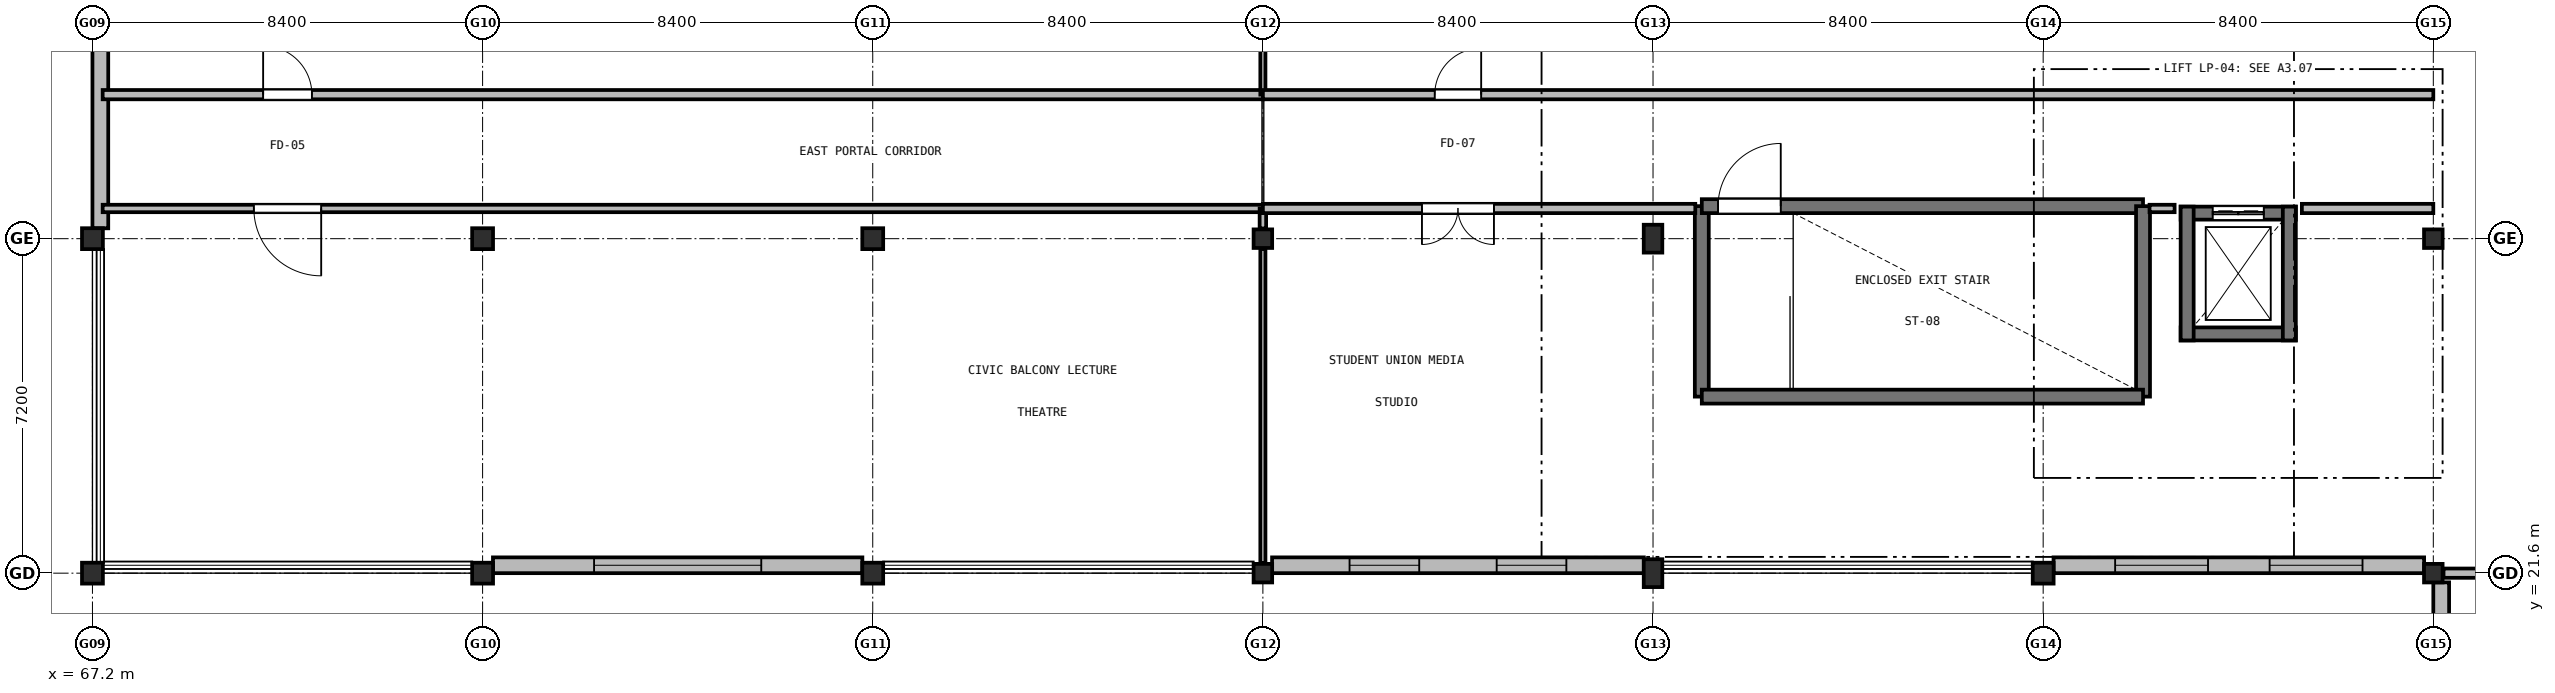
"""IFC4 building model, lengths in metres.
Left out: names, types, materials, properties, quantities, classifications, styles, units other than length and angle.
Written with IfcOpenShell. Run it as: python <this file> out.ifc"""

import sys

from ifc_helpers import new_model, si_unit, direction, frame, frame_2d, origin, origin_2d, place, context, subcontext, project, spatial, rectangle, extrude, element, fill, save


model = new_model("IFC4")
c1 = context("Model", 3, precision=1e-05, world=origin(), true_north=direction((0.0, 1.0)))
c2 = subcontext(c1, "Body", "Model", "MODEL_VIEW")
j1 = project(units=[si_unit("LENGTHUNIT", "METRE"), si_unit("PLANEANGLEUNIT", "RADIAN")], contexts=[c1])
p1 = place(None, origin())
s1 = spatial("IfcSite", under=j1, at=p1, CompositionType="ELEMENT")
p2 = place(p1, origin())
s2 = spatial("IfcBuilding", under=s1, at=p2, CompositionType="ELEMENT")
p3 = place(p2, frame((0.0, 0.0, 5.1)))
s3 = spatial("IfcBuildingStorey", under=s2, at=p3, CompositionType="ELEMENT", Elevation=5.1)
for number, where, z_axis, x_axis in (
    (1, (67.2, 21.6, 0.0), (0.0, 0.0, 1.0), (1.0, 0.0, 0.0)),
    (2, (67.2, 28.8, 0.0), (0.0, 0.0, 1.0), (1.0, 0.0, 0.0)),
    (3, (75.6, 21.6, 0.0), (0.0, 0.0, 1.0), (1.0, 0.0, 0.0)),
    (4, (75.6, 28.8, 0.0), (0.0, 0.0, 1.0), (1.0, 0.0, 0.0)),
    (5, (84.0, 21.6, 0.0), (0.0, 0.0, 1.0), (1.0, 0.0, 0.0)),
    (6, (84.0, 28.8, 0.0), (0.0, 0.0, 1.0), (1.0, 0.0, 0.0)),
):
    element("IfcColumn", number, at=place(p3, frame(where, z_axis=z_axis, x_axis=x_axis)), inside=s3, PredefinedType="COLUMN", context=c2, shape_type="SweptSolid", body=[
        extrude(rectangle(XDim=0.45, YDim=0.45, at=origin_2d()), origin(), (0.0, 0.0, 1.0), 4.2),
    ])
for number, where, z_axis, x_axis in (
    (7, (92.4, 21.6, 0.0), (0.0, 0.0, 1.0), (1.0, 0.0, 0.0)),
    (8, (92.4, 28.8, 0.0), (0.0, 0.0, 1.0), (1.0, 0.0, 0.0)),
):
    element("IfcColumn", number, at=place(p3, frame(where, z_axis=z_axis, x_axis=x_axis)), inside=s3, PredefinedType="COLUMN", context=c2, shape_type="SweptSolid", body=[
        extrude(rectangle(XDim=0.4, YDim=0.4, at=origin_2d()), origin(), (0.0, 0.0, 1.0), 4.2),
    ])
for number, where, z_axis, x_axis in (
    (9, (100.8, 21.6, 0.0), (0.0, 0.0, 1.0), (1.0, 0.0, 0.0)),
    (10, (100.8, 28.8, 0.0), (0.0, 0.0, 1.0), (1.0, 0.0, 0.0)),
):
    element("IfcColumn", number, at=place(p3, frame(where, z_axis=z_axis, x_axis=x_axis)), inside=s3, PredefinedType="COLUMN", context=c2, shape_type="SweptSolid", body=[
        extrude(rectangle(XDim=0.4, YDim=0.6, at=origin_2d()), origin(), (0.0, 0.0, 1.0), 4.2),
    ])
p4 = place(p3, frame((109.2, 21.6, 0.0), z_axis=(0.0, 0.0, 1.0), x_axis=(1.0, 0.0, 0.0)))
e11 = element("IfcColumn", 11, at=p4, inside=s3, PredefinedType="COLUMN", context=c2, shape_type="SweptSolid", body=[
    extrude(rectangle(XDim=0.45, YDim=0.45, at=origin_2d()), origin(), (0.0, 0.0, 1.0), 4.2),
])
for number, where, z_axis, x_axis in (
    (12, (117.6, 21.6, 0.0), (0.0, 0.0, 1.0), (1.0, 0.0, 0.0)),
    (13, (117.6, 28.8, 0.0), (0.0, 0.0, 1.0), (1.0, 0.0, 0.0)),
):
    element("IfcColumn", number, at=place(p3, frame(where, z_axis=z_axis, x_axis=x_axis)), inside=s3, PredefinedType="COLUMN", context=c2, shape_type="SweptSolid", body=[
        extrude(rectangle(XDim=0.4, YDim=0.4, at=origin_2d()), origin(), (0.0, 0.0, 1.0), 4.2),
    ])
p5 = place(p3, frame((117.77, 14.598, 0.0), z_axis=(0.0, 0.0, 1.0), x_axis=(0.0, 1.0, 0.0)))
e14 = element("IfcWall", 14, at=p5, inside=s3, PredefinedType="SOLIDWALL", context=c2, shape_type="SweptSolid", body=[
    extrude(rectangle(XDim=6.804, YDim=0.34, at=frame_2d((3.402, 0.0))), origin(), (0.0, 0.0, 1.0), 3.31),
])
p6 = place(p5, frame((2.202, 0.0, 0.95)))
e15 = element("IfcOpeningElement", 15, at=p6, cuts=e14, PredefinedType="OPENING", context=c2, shape_type="SweptSolid", body=[
    extrude(rectangle(XDim=2.4, YDim=1.6, at=frame_2d((1.2, 0.8))), frame((0.0, 0.18, 0.0), z_axis=(0.0, -1.0, 0.0), x_axis=(1.0, 0.0, 0.0)), (0.0, 0.0, 1.0), 0.36),
])
p7 = place(p3, frame((117.402, 21.77, 0.0), z_axis=(0.0, 0.0, 1.0), x_axis=(-1.0, 0.0, 0.0)))
e16 = element("IfcWall", 16, at=p7, inside=s3, PredefinedType="SOLIDWALL", context=c2, shape_type="SweptSolid", body=[
    extrude(rectangle(XDim=7.979, YDim=0.34, at=frame_2d((3.99, 0.0))), origin(), (0.0, 0.0, 1.0), 3.11),
])
p8 = place(p7, frame((1.326, 0.0, 0.95)))
e17 = element("IfcOpeningElement", 17, at=p8, cuts=e16, PredefinedType="OPENING", context=c2, shape_type="SweptSolid", body=[
    extrude(rectangle(XDim=2.0, YDim=1.5, at=frame_2d((1.0, 0.75))), frame((0.0, 0.18, 0.0), z_axis=(0.0, -1.0, 0.0), x_axis=(1.0, 0.0, 0.0)), (0.0, 0.0, 1.0), 0.36),
])
p9 = place(p7, frame((4.653, 0.0, 0.95)))
e18 = element("IfcOpeningElement", 18, at=p9, cuts=e16, PredefinedType="OPENING", context=c2, shape_type="SweptSolid", body=[
    extrude(rectangle(XDim=2.0, YDim=1.5, at=frame_2d((1.0, 0.75))), frame((0.0, 0.18, 0.0), z_axis=(0.0, -1.0, 0.0), x_axis=(1.0, 0.0, 0.0)), (0.0, 0.0, 1.0), 0.36),
])
p10 = place(p3, frame((100.602, 21.77, 0.0), z_axis=(0.0, 0.0, 1.0), x_axis=(-1.0, 0.0, 0.0)))
e19 = element("IfcWall", 19, at=p10, inside=s3, PredefinedType="SOLIDWALL", context=c2, shape_type="SweptSolid", body=[
    extrude(rectangle(XDim=8.004, YDim=0.34, at=frame_2d((4.002, 0.0))), origin(), (0.0, 0.0, 1.0), 3.11),
])
p11 = place(p10, frame((1.668, 0.0, 0.95)))
e20 = element("IfcOpeningElement", 20, at=p11, cuts=e19, PredefinedType="OPENING", context=c2, shape_type="SweptSolid", body=[
    extrude(rectangle(XDim=1.5, YDim=1.4, at=frame_2d((0.75, 0.7))), frame((0.0, 0.18, 0.0), z_axis=(0.0, -1.0, 0.0), x_axis=(1.0, 0.0, 0.0)), (0.0, 0.0, 1.0), 0.36),
])
p12 = place(p10, frame((4.836, 0.0, 0.95)))
e21 = element("IfcOpeningElement", 21, at=p12, cuts=e19, PredefinedType="OPENING", context=c2, shape_type="SweptSolid", body=[
    extrude(rectangle(XDim=1.5, YDim=1.4, at=frame_2d((0.75, 0.7))), frame((0.0, 0.18, 0.0), z_axis=(0.0, -1.0, 0.0), x_axis=(1.0, 0.0, 0.0)), (0.0, 0.0, 1.0), 0.36),
])
p13 = place(p3, frame((83.777, 21.77, 0.0), z_axis=(0.0, 0.0, 1.0), x_axis=(-1.0, 0.0, 0.0)))
e22 = element("IfcWall", 22, at=p13, inside=s3, PredefinedType="SOLIDWALL", context=c2, shape_type="SweptSolid", body=[
    extrude(rectangle(XDim=7.954, YDim=0.34, at=frame_2d((3.977, 0.0))), origin(), (0.0, 0.0, 1.0), 3.11),
])
p14 = place(p13, frame((2.177, 0.0, 0.95)))
e23 = element("IfcOpeningElement", 23, at=p14, cuts=e22, PredefinedType="OPENING", context=c2, shape_type="SweptSolid", body=[
    extrude(rectangle(XDim=3.6, YDim=1.91, at=frame_2d((1.8, 0.955))), frame((0.0, 0.18, 0.0), z_axis=(0.0, -1.0, 0.0), x_axis=(1.0, 0.0, 0.0)), (0.0, 0.0, 1.0), 0.36),
])
p15 = place(p3, frame((67.37, 29.023, 0.0), z_axis=(0.0, 0.0, 1.0), x_axis=(0.0, 1.0, 0.0)))
e24 = element("IfcWall", 24, at=p15, inside=s3, PredefinedType="SOLIDWALL", context=c2, shape_type="SweptSolid", body=[
    extrude(rectangle(XDim=6.754, YDim=0.34, at=frame_2d((3.377, 0.0))), origin(), (0.0, 0.0, 1.0), 3.31),
])
p16 = place(p3, frame((101.85, 25.4, 0.0), z_axis=(0.0, 0.0, 1.0), x_axis=(0.0, 1.0, 0.0)))
e25 = element("IfcWall", 25, at=p16, inside=s3, PredefinedType="SHEAR", context=c2, shape_type="SweptSolid", body=[
    extrude(rectangle(XDim=4.1, YDim=0.3, at=frame_2d((2.05, 0.0))), origin(), (0.0, 0.0, 1.0), 3.92),
])
p17 = place(p3, frame((101.85, 29.5, 0.0), z_axis=(0.0, 0.0, 1.0), x_axis=(1.0, 0.0, 0.0)))
e26 = element("IfcWall", 26, at=p17, inside=s3, PredefinedType="SHEAR", context=c2, shape_type="SweptSolid", body=[
    extrude(rectangle(XDim=9.5, YDim=0.3, at=frame_2d((4.75, 0.0))), origin(), (0.0, 0.0, 1.0), 3.92),
])
p18 = place(p17, frame((0.35, 0.0, 0.0)))
e27 = element("IfcOpeningElement", 27, at=p18, cuts=e26, PredefinedType="OPENING", context=c2, shape_type="SweptSolid", body=[
    extrude(rectangle(XDim=1.35, YDim=2.2, at=frame_2d((0.675, 1.1))), frame((0.0, 0.16, 0.0), z_axis=(0.0, -1.0, 0.0), x_axis=(1.0, 0.0, 0.0)), (0.0, 0.0, 1.0), 0.32),
])
p19 = place(p3, frame((111.35, 29.5, 0.0), z_axis=(0.0, 0.0, 1.0), x_axis=(0.0, -1.0, 0.0)))
e28 = element("IfcWall", 28, at=p19, inside=s3, PredefinedType="SHEAR", context=c2, shape_type="SweptSolid", body=[
    extrude(rectangle(XDim=4.1, YDim=0.3, at=frame_2d((2.05, 0.0))), origin(), (0.0, 0.0, 1.0), 3.92),
])
p20 = place(p3, frame((111.35, 25.4, 0.0), z_axis=(0.0, 0.0, 1.0), x_axis=(-1.0, 0.0, 0.0)))
e29 = element("IfcWall", 29, at=p20, inside=s3, PredefinedType="SHEAR", context=c2, shape_type="SweptSolid", body=[
    extrude(rectangle(XDim=9.5, YDim=0.3, at=frame_2d((4.75, 0.0))), origin(), (0.0, 0.0, 1.0), 3.92),
])
p21 = place(p3, frame((114.64, 26.75, 0.0), z_axis=(0.0, 0.0, 1.0), x_axis=(-1.0, 0.0, 0.0)))
e30 = element("IfcWall", 30, at=p21, inside=s3, PredefinedType="SHEAR", context=c2, shape_type="SweptSolid", body=[
    extrude(rectangle(XDim=2.48, YDim=0.28, at=frame_2d((1.24, 0.0))), origin(), (0.0, 0.0, 1.0), 3.92),
])
p22 = place(p3, frame((112.16, 29.35, 0.0), z_axis=(0.0, 0.0, 1.0), x_axis=(1.0, 0.0, 0.0)))
e31 = element("IfcWall", 31, at=p22, inside=s3, PredefinedType="SHEAR", context=c2, shape_type="SweptSolid", body=[
    extrude(rectangle(XDim=2.48, YDim=0.28, at=frame_2d((1.24, 0.0))), origin(), (0.0, 0.0, 1.0), 3.92),
])
p23 = place(p22, frame((0.69, 0.0, 0.0)))
e32 = element("IfcOpeningElement", 32, at=p23, cuts=e31, PredefinedType="OPENING", context=c2, shape_type="SweptSolid", body=[
    extrude(rectangle(XDim=1.1, YDim=2.15, at=frame_2d((0.55, 1.075))), frame((0.0, 0.15, 0.0), z_axis=(0.0, -1.0, 0.0), x_axis=(1.0, 0.0, 0.0)), (0.0, 0.0, 1.0), 0.3),
])
for number, where, z_axis, x_axis in (
    (33, (112.3, 26.61, 0.0), (0.0, 0.0, 1.0), (0.0, 1.0, 0.0)),
    (34, (114.5, 29.49, 0.0), (0.0, 0.0, 1.0), (0.0, -1.0, 0.0)),
):
    element("IfcWall", number, at=place(p3, frame(where, z_axis=z_axis, x_axis=x_axis)), inside=s3, PredefinedType="SHEAR", context=c2, shape_type="SweptSolid", body=[
        extrude(rectangle(XDim=2.88, YDim=0.28, at=frame_2d((1.44, 0.0))), origin(), (0.0, 0.0, 1.0), 3.92),
    ])
p24 = place(p3, frame((67.42, 31.9, 0.0), z_axis=(0.0, 0.0, 1.0), x_axis=(1.0, 0.0, 0.0)))
e35 = element("IfcWall", 35, at=p24, inside=s3, PredefinedType="SOLIDWALL", context=c2, shape_type="SweptSolid", body=[
    extrude(rectangle(XDim=24.98, YDim=0.2, at=frame_2d((12.49, 0.0))), origin(), (0.0, 0.0, 1.0), 3.305),
])
p25 = place(p24, frame((3.455, 0.0, 0.0)))
e36 = element("IfcOpeningElement", 36, at=p25, cuts=e35, PredefinedType="OPENING", context=c2, shape_type="SweptSolid", body=[
    extrude(rectangle(XDim=1.05, YDim=2.15, at=frame_2d((0.525, 1.075))), frame((0.0, 0.11, 0.0), z_axis=(0.0, -1.0, 0.0), x_axis=(1.0, 0.0, 0.0)), (0.0, 0.0, 1.0), 0.22),
])
p26 = place(p3, frame((92.4, 31.9, 0.0), z_axis=(0.0, 0.0, 1.0), x_axis=(0.0, 1.0, 0.0)))
e37 = element("IfcWall", 37, at=p26, inside=s3, PredefinedType="PARTITIONING", context=c2, shape_type="SweptSolid", body=[
    extrude(rectangle(XDim=3.83, YDim=0.11, at=frame_2d((1.915, 0.0))), origin(), (0.0, 0.0, 1.0), 3.105),
])
p27 = place(p3, frame((92.4, 31.9, 0.0), z_axis=(0.0, 0.0, 1.0), x_axis=(1.0, 0.0, 0.0)))
e38 = element("IfcWall", 38, at=p27, inside=s3, PredefinedType="SOLIDWALL", context=c2, shape_type="SweptSolid", body=[
    extrude(rectangle(XDim=25.2, YDim=0.2, at=frame_2d((12.6, 0.0))), origin(), (0.0, 0.0, 1.0), 3.305),
])
p28 = place(p27, frame((3.7, 0.0, 0.0)))
e39 = element("IfcOpeningElement", 39, at=p28, cuts=e38, PredefinedType="OPENING", context=c2, shape_type="SweptSolid", body=[
    extrude(rectangle(XDim=1.0, YDim=2.1, at=frame_2d((0.5, 1.05))), frame((0.0, 0.11, 0.0), z_axis=(0.0, -1.0, 0.0), x_axis=(1.0, 0.0, 0.0)), (0.0, 0.0, 1.0), 0.22),
])
p29 = place(p3, frame((92.4, 29.45, 0.0), z_axis=(0.0, 0.0, 1.0), x_axis=(-1.0, 0.0, 0.0)))
e40 = element("IfcWall", 40, at=p29, inside=s3, PredefinedType="PARTITIONING", context=c2, shape_type="SweptSolid", body=[
    extrude(rectangle(XDim=24.98, YDim=0.16, at=frame_2d((12.49, 0.0))), origin(), (0.0, 0.0, 1.0), 3.305),
])
p30 = place(p29, frame((20.275, 0.0, 0.0)))
e41 = element("IfcOpeningElement", 41, at=p30, cuts=e40, PredefinedType="OPENING", context=c2, shape_type="SweptSolid", body=[
    extrude(rectangle(XDim=1.45, YDim=2.2, at=frame_2d((0.725, 1.1))), frame((0.0, 0.09, 0.0), z_axis=(0.0, -1.0, 0.0), x_axis=(1.0, 0.0, 0.0)), (0.0, 0.0, 1.0), 0.18),
])
p31 = place(p3, frame((92.4, 21.82, 0.0), z_axis=(0.0, 0.0, 1.0), x_axis=(0.0, 1.0, 0.0)))
e42 = element("IfcWall", 42, at=p31, inside=s3, PredefinedType="PARTITIONING", context=c2, shape_type="SweptSolid", body=[
    extrude(rectangle(XDim=6.76, YDim=0.11, at=frame_2d((3.38, 0.0))), origin(), (0.0, 0.0, 1.0), 3.105),
])
p32 = place(p3, frame((92.4, 29.02, 0.0), z_axis=(0.0, 0.0, 1.0), x_axis=(0.0, 1.0, 0.0)))
e43 = element("IfcWall", 43, at=p32, inside=s3, PredefinedType="PARTITIONING", context=c2, shape_type="SweptSolid", body=[
    extrude(rectangle(XDim=0.43, YDim=0.14, at=frame_2d((0.215, 0.0))), origin(), (0.0, 0.0, 1.0), 3.155),
])
p33 = place(p3, frame((117.6, 29.45, 0.0), z_axis=(0.0, 0.0, 1.0), x_axis=(-1.0, 0.0, 0.0)))
e44 = element("IfcWall", 44, at=p33, inside=s3, PredefinedType="SOLIDWALL", context=c2, shape_type="SweptSolid", body=[
    extrude(rectangle(XDim=2.83, YDim=0.2, at=frame_2d((1.415, 0.0))), origin(), (0.0, 0.0, 1.0), 3.305),
])
p34 = place(p3, frame((112.03, 29.45, 0.0), z_axis=(0.0, 0.0, 1.0), x_axis=(-1.0, 0.0, 0.0)))
e45 = element("IfcWall", 45, at=p34, inside=s3, PredefinedType="PARTITIONING", context=c2, shape_type="SweptSolid", body=[
    extrude(rectangle(XDim=0.54, YDim=0.16, at=frame_2d((0.27, 0.0))), origin(), (0.0, 0.0, 1.0), 3.85),
])
p35 = place(p3, frame((101.71, 29.45, 0.0), z_axis=(0.0, 0.0, 1.0), x_axis=(-1.0, 0.0, 0.0)))
e46 = element("IfcWall", 46, at=p35, inside=s3, PredefinedType="SOLIDWALL", context=c2, shape_type="SweptSolid", body=[
    extrude(rectangle(XDim=9.31, YDim=0.2, at=frame_2d((4.655, 0.0))), origin(), (0.0, 0.0, 1.0), 3.305),
])
p36 = place(p35, frame((4.335, 0.0, 0.0)))
e47 = element("IfcOpeningElement", 47, at=p36, cuts=e46, PredefinedType="OPENING", context=c2, shape_type="SweptSolid", body=[
    extrude(rectangle(XDim=1.55, YDim=2.2, at=frame_2d((0.775, 1.1))), frame((0.0, 0.11, 0.0), z_axis=(0.0, -1.0, 0.0), x_axis=(1.0, 0.0, 0.0)), (0.0, 0.0, 1.0), 0.22),
])
p37 = place(p3, frame((125.78, 21.6, 0.0), z_axis=(0.0, 0.0, 1.0), x_axis=(-1.0, 0.0, 0.0)))
e48 = element("IfcWall", 48, at=p37, inside=s3, PredefinedType="SOLIDWALL", context=c2, shape_type="SweptSolid", body=[
    extrude(rectangle(XDim=7.96, YDim=0.2, at=frame_2d((3.98, 0.0))), origin(), (0.0, 0.0, 1.0), 3.155),
])
p38 = place(p8, origin())
e49 = element("IfcWindow", 49, at=p38, inside=s3, PartitioningType="SINGLE_PANEL", PredefinedType="WINDOW", context=c2, shape_type="SweptSolid", body=[
    extrude(rectangle(XDim=2.0, YDim=1.5, at=frame_2d((1.0, 0.75))), frame((0.0, 0.03, 0.0), z_axis=(0.0, -1.0, 0.0), x_axis=(1.0, 0.0, 0.0)), (0.0, 0.0, 1.0), 0.06),
])
fill(e17, e49)
p39 = place(p9, origin())
e50 = element("IfcWindow", 50, at=p39, inside=s3, PartitioningType="SINGLE_PANEL", PredefinedType="WINDOW", context=c2, shape_type="SweptSolid", body=[
    extrude(rectangle(XDim=2.0, YDim=1.5, at=frame_2d((1.0, 0.75))), frame((0.0, 0.03, 0.0), z_axis=(0.0, -1.0, 0.0), x_axis=(1.0, 0.0, 0.0)), (0.0, 0.0, 1.0), 0.06),
])
fill(e18, e50)
p40 = place(p11, origin())
e51 = element("IfcWindow", 51, at=p40, inside=s3, PartitioningType="SINGLE_PANEL", PredefinedType="WINDOW", context=c2, shape_type="SweptSolid", body=[
    extrude(rectangle(XDim=1.5, YDim=1.4, at=frame_2d((0.75, 0.7))), frame((0.0, 0.03, 0.0), z_axis=(0.0, -1.0, 0.0), x_axis=(1.0, 0.0, 0.0)), (0.0, 0.0, 1.0), 0.06),
])
fill(e20, e51)
p41 = place(p12, origin())
e52 = element("IfcWindow", 52, at=p41, inside=s3, PartitioningType="SINGLE_PANEL", PredefinedType="WINDOW", context=c2, shape_type="SweptSolid", body=[
    extrude(rectangle(XDim=1.5, YDim=1.4, at=frame_2d((0.75, 0.7))), frame((0.0, 0.03, 0.0), z_axis=(0.0, -1.0, 0.0), x_axis=(1.0, 0.0, 0.0)), (0.0, 0.0, 1.0), 0.06),
])
fill(e21, e52)
p42 = place(p14, origin())
e53 = element("IfcWindow", 53, at=p42, inside=s3, PartitioningType="SINGLE_PANEL", PredefinedType="WINDOW", context=c2, shape_type="SweptSolid", body=[
    extrude(rectangle(XDim=3.6, YDim=1.91, at=frame_2d((1.8, 0.955))), frame((0.0, 0.03, 0.0), z_axis=(0.0, -1.0, 0.0), x_axis=(1.0, 0.0, 0.0)), (0.0, 0.0, 1.0), 0.06),
])
fill(e23, e53)
p43 = place(p18, origin())
e54 = element("IfcDoor", 54, at=p43, inside=s3, OperationType="SINGLE_SWING_RIGHT", PredefinedType="DOOR", context=c2, shape_type="SweptSolid", body=[
    extrude(rectangle(XDim=1.35, YDim=2.2, at=frame_2d((0.675, 1.1))), frame((0.0, 0.025, 0.0), z_axis=(0.0, -1.0, 0.0), x_axis=(1.0, 0.0, 0.0)), (0.0, 0.0, 1.0), 0.05),
])
fill(e27, e54)
p44 = place(p23, origin())
e55 = element("IfcDoor", 55, at=p44, inside=s3, OperationType="DOUBLE_DOOR_SLIDING", PredefinedType="DOOR", context=c2, shape_type="SweptSolid", body=[
    extrude(rectangle(XDim=1.1, YDim=2.15, at=frame_2d((0.55, 1.075))), frame((0.0, 0.025, 0.0), z_axis=(0.0, -1.0, 0.0), x_axis=(1.0, 0.0, 0.0)), (0.0, 0.0, 1.0), 0.05),
])
fill(e32, e55)
p45 = place(p25, origin())
e56 = element("IfcDoor", 56, at=p45, inside=s3, OperationType="SINGLE_SWING_LEFT", PredefinedType="DOOR", context=c2, shape_type="SweptSolid", body=[
    extrude(rectangle(XDim=1.05, YDim=2.15, at=frame_2d((0.525, 1.075))), frame((0.0, 0.025, 0.0), z_axis=(0.0, -1.0, 0.0), x_axis=(1.0, 0.0, 0.0)), (0.0, 0.0, 1.0), 0.05),
])
fill(e36, e56)
p46 = place(p28, origin())
e57 = element("IfcDoor", 57, at=p46, inside=s3, OperationType="SINGLE_SWING_RIGHT", PredefinedType="DOOR", context=c2, shape_type="SweptSolid", body=[
    extrude(rectangle(XDim=1.0, YDim=2.1, at=frame_2d((0.5, 1.05))), frame((0.0, 0.025, 0.0), z_axis=(0.0, -1.0, 0.0), x_axis=(1.0, 0.0, 0.0)), (0.0, 0.0, 1.0), 0.05),
])
fill(e39, e57)
p47 = place(p30, origin())
e58 = element("IfcDoor", 58, at=p47, inside=s3, OperationType="SINGLE_SWING_LEFT", PredefinedType="DOOR", context=c2, shape_type="SweptSolid", body=[
    extrude(rectangle(XDim=1.45, YDim=2.2, at=frame_2d((0.725, 1.1))), frame((0.0, 0.025, 0.0), z_axis=(0.0, -1.0, 0.0), x_axis=(1.0, 0.0, 0.0)), (0.0, 0.0, 1.0), 0.05),
])
fill(e41, e58)
p48 = place(p36, origin())
e59 = element("IfcDoor", 59, at=p48, inside=s3, OperationType="DOUBLE_DOOR_SINGLE_SWING", PredefinedType="DOOR", context=c2, shape_type="SweptSolid", body=[
    extrude(rectangle(XDim=1.55, YDim=2.2, at=frame_2d((0.775, 1.1))), frame((0.0, 0.025, 0.0), z_axis=(0.0, -1.0, 0.0), x_axis=(1.0, 0.0, 0.0)), (0.0, 0.0, 1.0), 0.05),
])
fill(e47, e59)
save(model, sys.argv[1])
